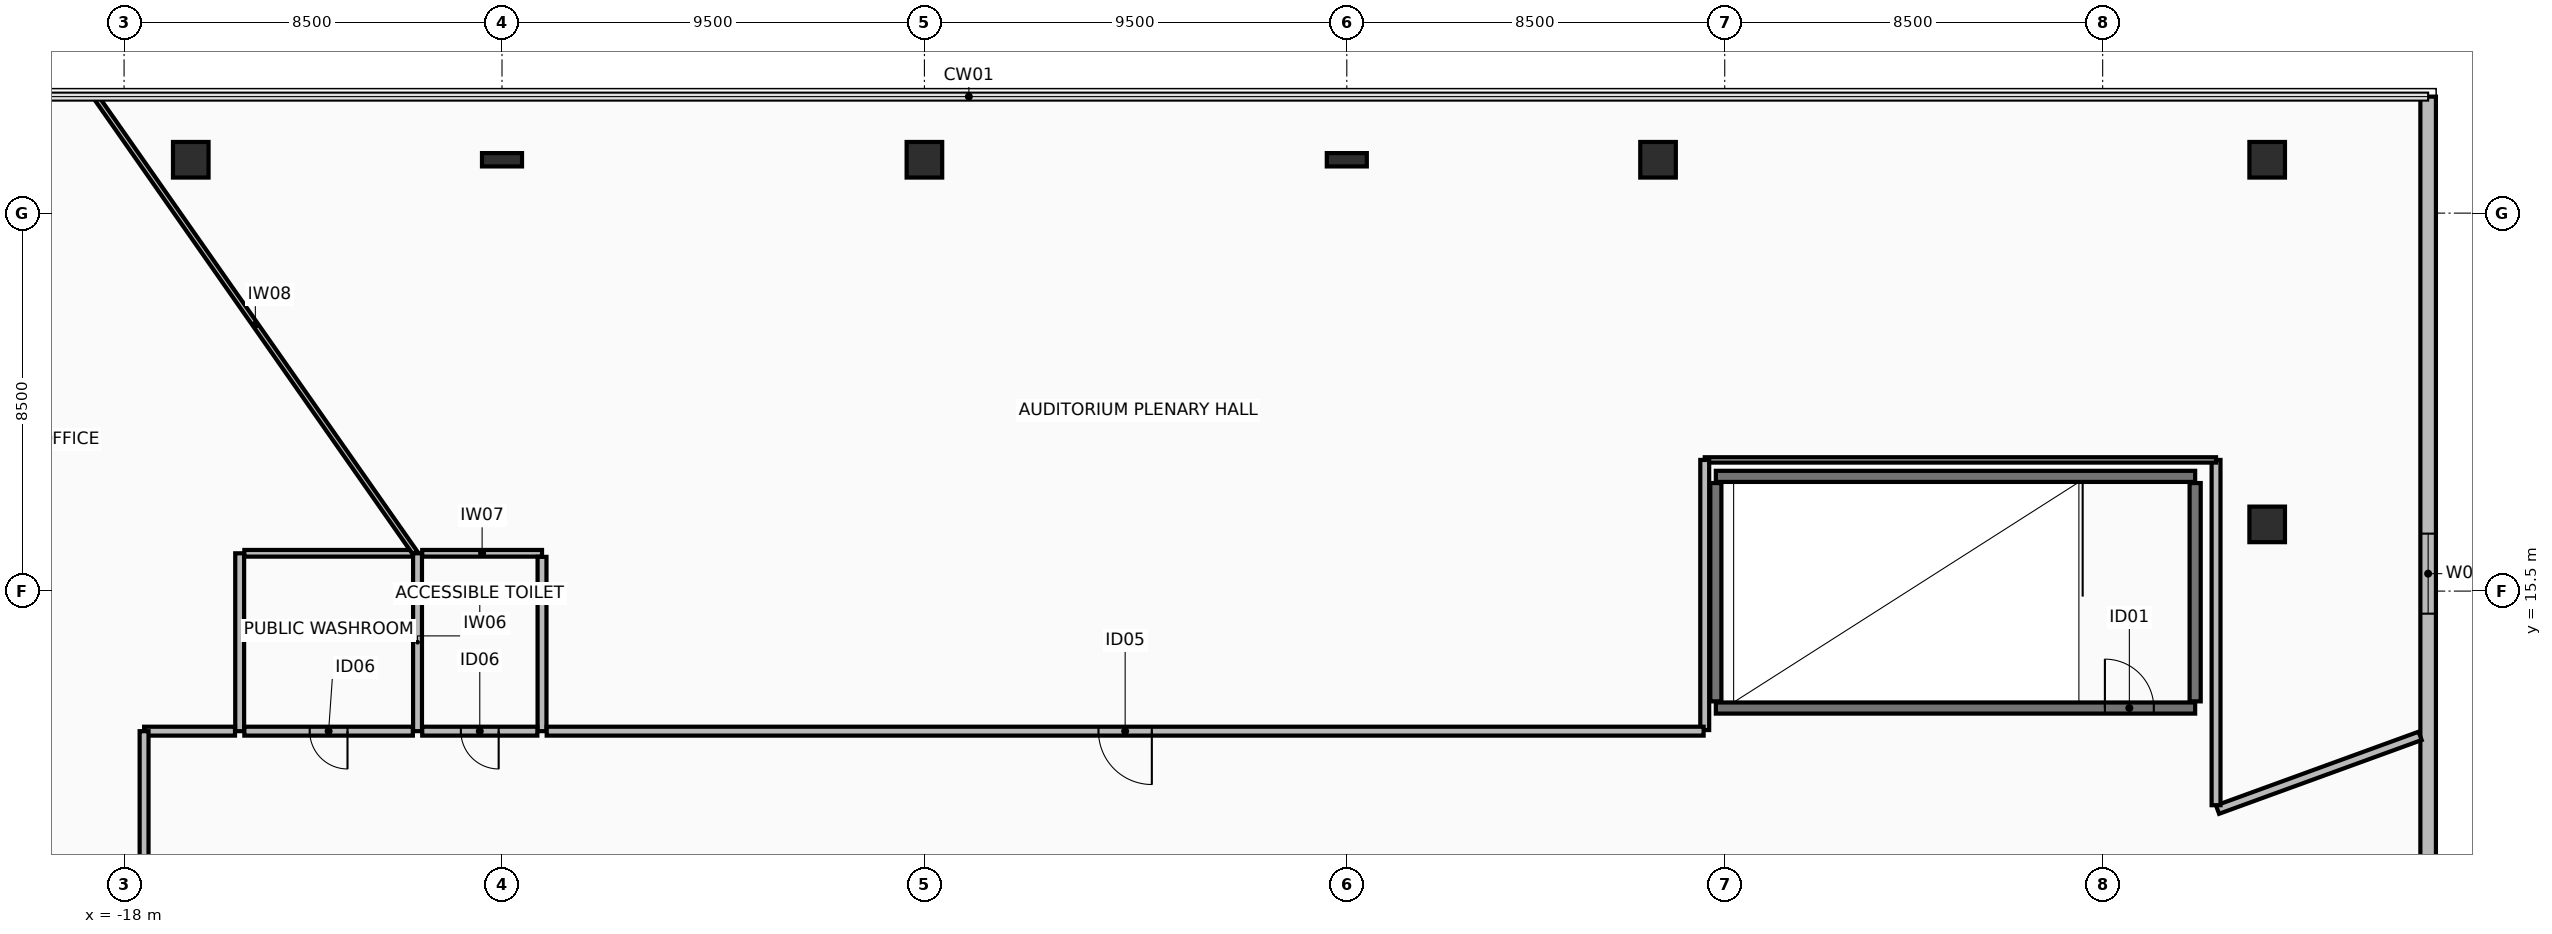
"""IFC4 building model, lengths in metres.
Left out: names, types, materials, properties, quantities, classifications, styles, units other than length and angle.
Written with IfcOpenShell. Run it as: python <this file> out.ifc"""

import sys

from ifc_helpers import new_model, si_unit, direction, frame, frame_2d, origin, origin_2d, place, context, subcontext, project, spatial, rectangle, hollow_rectangle, i_section, extrude, element, fill, save


model = new_model("IFC4")
c1 = context("Model", 3, precision=1e-05, world=origin(), true_north=direction((0.0, 1.0)))
c2 = subcontext(c1, "Body", "Model", "MODEL_VIEW")
j1 = project(units=[si_unit("LENGTHUNIT", "METRE"), si_unit("PLANEANGLEUNIT", "RADIAN")], contexts=[c1])
p1 = place(None, origin())
s1 = spatial("IfcSite", under=j1, at=p1, CompositionType="ELEMENT")
p2 = place(p1, origin())
s2 = spatial("IfcBuilding", under=s1, at=p2, CompositionType="ELEMENT")
p3 = place(p2, frame((0.0, 0.0, 26.5)))
s3 = spatial("IfcBuildingStorey", under=s2, at=p3, CompositionType="ELEMENT", Elevation=26.5)
p4 = place(p3, frame((-16.5, 25.2, 0.0), z_axis=(0.0, 0.0, 1.0), x_axis=(1.0, 0.0, 0.0)))
e1 = element("IfcColumn", 1, at=p4, inside=s3, PredefinedType="COLUMN", context=c2, shape_type="SweptSolid", body=[
    extrude(hollow_rectangle(XDim=0.8, YDim=0.8, WallThickness=0.045, at=origin_2d()), origin(), (0.0, 0.0, 1.0), 5.3),
])
p5 = place(p3, frame((-9.5, 25.2, 0.0), z_axis=(0.0, 0.0, 1.0), x_axis=(1.0, 0.0, 0.0)))
e2 = element("IfcColumn", 2, at=p5, inside=s3, PredefinedType="COLUMN", context=c2, shape_type="SweptSolid", body=[
    extrude(i_section(OverallWidth=0.3, OverallDepth=0.9, WebThickness=0.019, FlangeThickness=0.035, at=origin_2d()), origin(), (0.0, 0.0, 1.0), 5.3),
])
p6 = place(p3, frame((0.0, 25.2, 0.0), z_axis=(0.0, 0.0, 1.0), x_axis=(1.0, 0.0, 0.0)))
e3 = element("IfcColumn", 3, at=p6, inside=s3, PredefinedType="COLUMN", context=c2, shape_type="SweptSolid", body=[
    extrude(hollow_rectangle(XDim=0.8, YDim=0.8, WallThickness=0.045, at=origin_2d()), origin(), (0.0, 0.0, 1.0), 5.3),
])
p7 = place(p3, frame((9.5, 25.2, 0.0), z_axis=(0.0, 0.0, 1.0), x_axis=(1.0, 0.0, 0.0)))
e4 = element("IfcColumn", 4, at=p7, inside=s3, PredefinedType="COLUMN", context=c2, shape_type="SweptSolid", body=[
    extrude(i_section(OverallWidth=0.3, OverallDepth=0.9, WebThickness=0.019, FlangeThickness=0.035, at=origin_2d()), origin(), (0.0, 0.0, 1.0), 5.3),
])
for number, where, z_axis, x_axis in (
    (5, (16.5, 25.2, 0.0), (0.0, 0.0, 1.0), (1.0, 0.0, 0.0)),
    (6, (30.2, 25.2, 0.0), (0.0, 0.0, 1.0), (1.0, 0.0, 0.0)),
    (7, (30.2, 17.0, 0.0), (0.0, 0.0, 1.0), (1.0, 0.0, 0.0)),
):
    element("IfcColumn", number, at=place(p3, frame(where, z_axis=z_axis, x_axis=x_axis)), inside=s3, PredefinedType="COLUMN", context=c2, shape_type="SweptSolid", body=[
        extrude(hollow_rectangle(XDim=0.8, YDim=0.8, WallThickness=0.045, at=origin_2d()), origin(), (0.0, 0.0, 1.0), 5.3),
    ])
p8 = place(p3, frame((33.82, -27.02, 0.0), z_axis=(0.0, 0.0, 1.0), x_axis=(0.0, 1.0, 0.0)))
e8 = element("IfcWall", 8, at=p8, inside=s3, PredefinedType="STANDARD", context=c2, shape_type="SweptSolid", body=[
    extrude(rectangle(XDim=53.64, YDim=0.35, at=frame_2d((26.82, 0.0))), origin(), (0.0, 0.0, 1.0), 5.105),
])
p9 = place(p8, frame((9.828, 0.0, 0.95)))
e9 = element("IfcOpeningElement", 9, at=p9, cuts=e8, PredefinedType="OPENING", context=c2, shape_type="SweptSolid", body=[
    extrude(rectangle(XDim=1.8, YDim=2.2, at=frame_2d((0.9, 1.1))), frame((0.0, 0.185, 0.0), z_axis=(0.0, -1.0, 0.0), x_axis=(1.0, 0.0, 0.0)), (0.0, 0.0, 1.0), 0.37),
])
p10 = place(p8, frame((20.556, 0.0, 0.95)))
e10 = element("IfcOpeningElement", 10, at=p10, cuts=e8, PredefinedType="OPENING", context=c2, shape_type="SweptSolid", body=[
    extrude(rectangle(XDim=1.8, YDim=2.2, at=frame_2d((0.9, 1.1))), frame((0.0, 0.185, 0.0), z_axis=(0.0, -1.0, 0.0), x_axis=(1.0, 0.0, 0.0)), (0.0, 0.0, 1.0), 0.37),
])
p11 = place(p8, frame((31.284, 0.0, 0.95)))
e11 = element("IfcOpeningElement", 11, at=p11, cuts=e8, PredefinedType="OPENING", context=c2, shape_type="SweptSolid", body=[
    extrude(rectangle(XDim=1.8, YDim=2.2, at=frame_2d((0.9, 1.1))), frame((0.0, 0.185, 0.0), z_axis=(0.0, -1.0, 0.0), x_axis=(1.0, 0.0, 0.0)), (0.0, 0.0, 1.0), 0.37),
])
p12 = place(p8, frame((42.012, 0.0, 0.95)))
e12 = element("IfcOpeningElement", 12, at=p12, cuts=e8, PredefinedType="OPENING", context=c2, shape_type="SweptSolid", body=[
    extrude(rectangle(XDim=1.8, YDim=2.2, at=frame_2d((0.9, 1.1))), frame((0.0, 0.185, 0.0), z_axis=(0.0, -1.0, 0.0), x_axis=(1.0, 0.0, 0.0)), (0.0, 0.0, 1.0), 0.37),
])
p13 = place(p3, frame((17.8, 12.87, 0.0), z_axis=(0.0, 0.0, 1.0), x_axis=(1.0, 0.0, 0.0)))
e13 = element("IfcWall", 13, at=p13, inside=s3, PredefinedType="SHEAR", context=c2, shape_type="SweptSolid", body=[
    extrude(rectangle(XDim=10.78, YDim=0.25, at=frame_2d((5.39, 0.0))), origin(), (0.0, 0.0, 1.0), 5.105),
])
p14 = place(p13, frame((8.75, 0.0, 0.0)))
e14 = element("IfcOpeningElement", 14, at=p14, cuts=e13, PredefinedType="OPENING", context=c2, shape_type="SweptSolid", body=[
    extrude(rectangle(XDim=1.1, YDim=2.15, at=frame_2d((0.55, 1.075))), frame((0.0, 0.135, 0.0), z_axis=(0.0, -1.0, 0.0), x_axis=(1.0, 0.0, 0.0)), (0.0, 0.0, 1.0), 0.27),
])
p15 = place(p3, frame((17.8, 18.08, 0.0), z_axis=(0.0, 0.0, 1.0), x_axis=(1.0, 0.0, 0.0)))
e15 = element("IfcWall", 15, at=p15, inside=s3, PredefinedType="SHEAR", context=c2, shape_type="SweptSolid", body=[
    extrude(rectangle(XDim=10.78, YDim=0.25, at=frame_2d((5.39, 0.0))), origin(), (0.0, 0.0, 1.0), 5.105),
])
for number, where, z_axis, x_axis in (
    (16, (17.8, 13.02, 0.0), (0.0, 0.0, 1.0), (0.0, 1.0, 0.0)),
    (17, (28.58, 13.02, 0.0), (0.0, 0.0, 1.0), (0.0, 1.0, 0.0)),
):
    element("IfcWall", number, at=place(p3, frame(where, z_axis=z_axis, x_axis=x_axis)), inside=s3, PredefinedType="SHEAR", context=c2, shape_type="SweptSolid", body=[
        extrude(rectangle(XDim=4.91, YDim=0.25, at=frame_2d((2.455, 0.0))), origin(), (0.0, 0.0, 1.0), 5.105),
    ])
p16 = place(p3, frame((-11.4, 12.35, 0.0), z_axis=(0.0, 0.0, 1.0), x_axis=(0.0, 1.0, 0.0)))
e18 = element("IfcWall", 18, at=p16, inside=s3, PredefinedType="PARTITIONING", context=c2, shape_type="SweptSolid", body=[
    extrude(rectangle(XDim=4.0, YDim=0.2, at=frame_2d((2.0, 0.0))), origin(), (0.0, 0.0, 1.0), 2.9),
])
p17 = place(p3, frame((-11.295, 16.35, 0.0), z_axis=(0.0, 0.0, 1.0), x_axis=(1.0, 0.0, 0.0)))
e19 = element("IfcWall", 19, at=p17, inside=s3, PredefinedType="PARTITIONING", context=c2, shape_type="SweptSolid", body=[
    extrude(rectangle(XDim=2.695, YDim=0.15, at=frame_2d((1.347, 0.0))), origin(), (0.0, 0.0, 1.0), 2.9),
])
p18 = place(p3, frame((-8.6, 16.27, 0.0), z_axis=(0.0, 0.0, 1.0), x_axis=(0.0, -1.0, 0.0)))
e20 = element("IfcWall", 20, at=p18, inside=s3, PredefinedType="PARTITIONING", context=c2, shape_type="SweptSolid", body=[
    extrude(rectangle(XDim=3.92, YDim=0.2, at=frame_2d((1.96, 0.0))), origin(), (0.0, 0.0, 1.0), 2.9),
])
p19 = place(p3, frame((-8.705, 12.35, 0.0), z_axis=(0.0, 0.0, 1.0), x_axis=(-1.0, 0.0, 0.0)))
e21 = element("IfcWall", 21, at=p19, inside=s3, PredefinedType="PARTITIONING", context=c2, shape_type="SweptSolid", body=[
    extrude(rectangle(XDim=2.59, YDim=0.2, at=frame_2d((1.295, 0.0))), origin(), (0.0, 0.0, 1.0), 2.9),
])
p20 = place(p19, frame((0.87, 0.0, 0.0)))
e22 = element("IfcOpeningElement", 22, at=p20, cuts=e21, PredefinedType="OPENING", context=c2, shape_type="SweptSolid", body=[
    extrude(rectangle(XDim=0.85, YDim=2.1, at=frame_2d((0.425, 1.05))), frame((0.0, 0.11, 0.0), z_axis=(0.0, -1.0, 0.0), x_axis=(1.0, 0.0, 0.0)), (0.0, 0.0, 1.0), 0.22),
])
p21 = place(p3, frame((-15.4, 12.35, 0.0), z_axis=(0.0, 0.0, 1.0), x_axis=(0.0, 1.0, 0.0)))
e23 = element("IfcWall", 23, at=p21, inside=s3, PredefinedType="PARTITIONING", context=c2, shape_type="SweptSolid", body=[
    extrude(rectangle(XDim=4.0, YDim=0.2, at=frame_2d((2.0, 0.0))), origin(), (0.0, 0.0, 1.0), 3.3),
])
p22 = place(p3, frame((-15.295, 16.35, 0.0), z_axis=(0.0, 0.0, 1.0), x_axis=(1.0, 0.0, 0.0)))
e24 = element("IfcWall", 24, at=p22, inside=s3, PredefinedType="PARTITIONING", context=c2, shape_type="SweptSolid", body=[
    extrude(rectangle(XDim=3.79, YDim=0.15, at=frame_2d((1.895, 0.0))), origin(), (0.0, 0.0, 1.0), 5.105),
])
p23 = place(p3, frame((-11.505, 12.35, 0.0), z_axis=(0.0, 0.0, 1.0), x_axis=(-1.0, 0.0, 0.0)))
e25 = element("IfcWall", 25, at=p23, inside=s3, PredefinedType="PARTITIONING", context=c2, shape_type="SweptSolid", body=[
    extrude(rectangle(XDim=3.79, YDim=0.2, at=frame_2d((1.895, 0.0))), origin(), (0.0, 0.0, 1.0), 2.9),
])
p24 = place(p23, frame((1.47, 0.0, 0.0)))
e26 = element("IfcOpeningElement", 26, at=p24, cuts=e25, PredefinedType="OPENING", context=c2, shape_type="SweptSolid", body=[
    extrude(rectangle(XDim=0.85, YDim=2.1, at=frame_2d((0.425, 1.05))), frame((0.0, 0.11, 0.0), z_axis=(0.0, -1.0, 0.0), x_axis=(1.0, 0.0, 0.0)), (0.0, 0.0, 1.0), 0.22),
])
p25 = place(p3, frame((-11.456, 16.361, 0.0), z_axis=(0.0, 0.0, 1.0), x_axis=(-0.573565692607, 0.819159567035, 0.0)))
e27 = element("IfcWall", 27, at=p25, inside=s3, PredefinedType="PARTITIONING", context=c2, shape_type="SweptSolid", body=[
    extrude(rectangle(XDim=12.524, YDim=0.12, at=frame_2d((6.262, 0.0))), origin(), (0.0, 0.0, 1.0), 2.8),
])
p26 = place(p3, frame((33.64, 12.244, 0.0), z_axis=(0.0, 0.0, 1.0), x_axis=(-0.9396890037, -0.342030081023, 0.0)))
e28 = element("IfcWall", 28, at=p26, inside=s3, PredefinedType="PARTITIONING", context=c2, shape_type="SweptSolid", body=[
    extrude(rectangle(XDim=4.849, YDim=0.2, at=frame_2d((2.424, 0.0))), origin(), (0.0, 0.0, 1.0), 2.8),
])
p27 = place(p3, frame((29.05, 10.685, 0.0), z_axis=(0.0, 0.0, 1.0), x_axis=(0.0, 1.0, 0.0)))
e29 = element("IfcWall", 29, at=p27, inside=s3, PredefinedType="PARTITIONING", context=c2, shape_type="SweptSolid", body=[
    extrude(rectangle(XDim=7.764, YDim=0.2, at=frame_2d((3.882, 0.0))), origin(), (0.0, 0.0, 1.0), 4.7),
])
p28 = place(p3, frame((29.049, 18.45, 0.0), z_axis=(0.0, 0.0, 1.0), x_axis=(-1.0, 0.0, 0.0)))
e30 = element("IfcWall", 30, at=p28, inside=s3, PredefinedType="PARTITIONING", context=c2, shape_type="SweptSolid", body=[
    extrude(rectangle(XDim=11.499, YDim=0.12, at=frame_2d((5.75, 0.0))), origin(), (0.0, 0.0, 1.0), 5.105),
])
p29 = place(p3, frame((17.55, 18.449, 0.0), z_axis=(0.0, 0.0, 1.0), x_axis=(0.0, -1.0, 0.0)))
e31 = element("IfcWall", 31, at=p29, inside=s3, PredefinedType="PARTITIONING", context=c2, shape_type="SweptSolid", body=[
    extrude(rectangle(XDim=6.074, YDim=0.2, at=frame_2d((3.037, 0.0))), origin(), (0.0, 0.0, 1.0), 4.7),
])
p30 = place(p3, frame((17.525, 12.35, 0.0), z_axis=(0.0, 0.0, 1.0), x_axis=(-1.0, 0.0, 0.0)))
e32 = element("IfcWall", 32, at=p30, inside=s3, PredefinedType="PARTITIONING", context=c2, shape_type="SweptSolid", body=[
    extrude(rectangle(XDim=26.02, YDim=0.2, at=frame_2d((13.01, 0.0))), origin(), (0.0, 0.0, 1.0), 2.9),
])
p31 = place(p30, frame((12.41, 0.0, 0.0)))
e33 = element("IfcOpeningElement", 33, at=p31, cuts=e32, PredefinedType="OPENING", context=c2, shape_type="SweptSolid", body=[
    extrude(rectangle(XDim=1.2, YDim=2.15, at=frame_2d((0.6, 1.075))), frame((0.0, 0.11, 0.0), z_axis=(0.0, -1.0, 0.0), x_axis=(1.0, 0.0, 0.0)), (0.0, 0.0, 1.0), 0.22),
])
p32 = place(p3, frame((-15.505, 12.35, 0.0), z_axis=(0.0, 0.0, 1.0), x_axis=(-1.0, 0.0, 0.0)))
e34 = element("IfcWall", 34, at=p32, inside=s3, PredefinedType="PARTITIONING", context=c2, shape_type="SweptSolid", body=[
    extrude(rectangle(XDim=2.044, YDim=0.2, at=frame_2d((1.022, 0.0))), origin(), (0.0, 0.0, 1.0), 3.3),
])
p33 = place(p3, frame((-17.55, 12.349, 0.0), z_axis=(0.0, 0.0, 1.0), x_axis=(0.0, -1.0, 0.0)))
e35 = element("IfcWall", 35, at=p33, inside=s3, PredefinedType="PARTITIONING", context=c2, shape_type="SweptSolid", body=[
    extrude(rectangle(XDim=17.033, YDim=0.2, at=frame_2d((8.516, 0.0))), origin(), (0.0, 0.0, 1.0), 3.3),
])
p34 = place(p33, frame((8.016, 0.0, 0.0)))
e36 = element("IfcOpeningElement", 36, at=p34, cuts=e35, PredefinedType="OPENING", context=c2, shape_type="SweptSolid", body=[
    extrude(rectangle(XDim=1.0, YDim=2.15, at=frame_2d((0.5, 1.075))), frame((0.0, 0.11, 0.0), z_axis=(0.0, -1.0, 0.0), x_axis=(1.0, 0.0, 0.0)), (0.0, 0.0, 1.0), 0.22),
])
p35 = place(p12, origin())
e37 = element("IfcWindow", 37, at=p35, inside=s3, PartitioningType="SINGLE_PANEL", PredefinedType="WINDOW", context=c2, shape_type="SweptSolid", body=[
    extrude(rectangle(XDim=1.8, YDim=2.2, at=frame_2d((0.9, 1.1))), frame((0.0, 0.03, 0.0), z_axis=(0.0, -1.0, 0.0), x_axis=(1.0, 0.0, 0.0)), (0.0, 0.0, 1.0), 0.06),
])
fill(e12, e37)
p36 = place(p14, origin())
e38 = element("IfcDoor", 38, at=p36, inside=s3, OperationType="SINGLE_SWING_LEFT", PredefinedType="DOOR", context=c2, shape_type="SweptSolid", body=[
    extrude(rectangle(XDim=1.1, YDim=2.15, at=frame_2d((0.55, 1.075))), frame((0.0, 0.025, 0.0), z_axis=(0.0, -1.0, 0.0), x_axis=(1.0, 0.0, 0.0)), (0.0, 0.0, 1.0), 0.05),
])
fill(e14, e38)
p37 = place(p20, origin())
e39 = element("IfcDoor", 39, at=p37, inside=s3, OperationType="SINGLE_SWING_RIGHT", PredefinedType="DOOR", context=c2, shape_type="SweptSolid", body=[
    extrude(rectangle(XDim=0.85, YDim=2.1, at=frame_2d((0.425, 1.05))), frame((0.0, 0.025, 0.0), z_axis=(0.0, -1.0, 0.0), x_axis=(1.0, 0.0, 0.0)), (0.0, 0.0, 1.0), 0.05),
])
fill(e22, e39)
p38 = place(p24, origin())
e40 = element("IfcDoor", 40, at=p38, inside=s3, OperationType="SINGLE_SWING_RIGHT", PredefinedType="DOOR", context=c2, shape_type="SweptSolid", body=[
    extrude(rectangle(XDim=0.85, YDim=2.1, at=frame_2d((0.425, 1.05))), frame((0.0, 0.025, 0.0), z_axis=(0.0, -1.0, 0.0), x_axis=(1.0, 0.0, 0.0)), (0.0, 0.0, 1.0), 0.05),
])
fill(e26, e40)
p39 = place(p31, origin())
e41 = element("IfcDoor", 41, at=p39, inside=s3, OperationType="SINGLE_SWING_LEFT", PredefinedType="DOOR", context=c2, shape_type="SweptSolid", body=[
    extrude(rectangle(XDim=1.2, YDim=2.15, at=frame_2d((0.6, 1.075))), frame((0.0, 0.025, 0.0), z_axis=(0.0, -1.0, 0.0), x_axis=(1.0, 0.0, 0.0)), (0.0, 0.0, 1.0), 0.05),
])
fill(e33, e41)
save(model, sys.argv[1])
